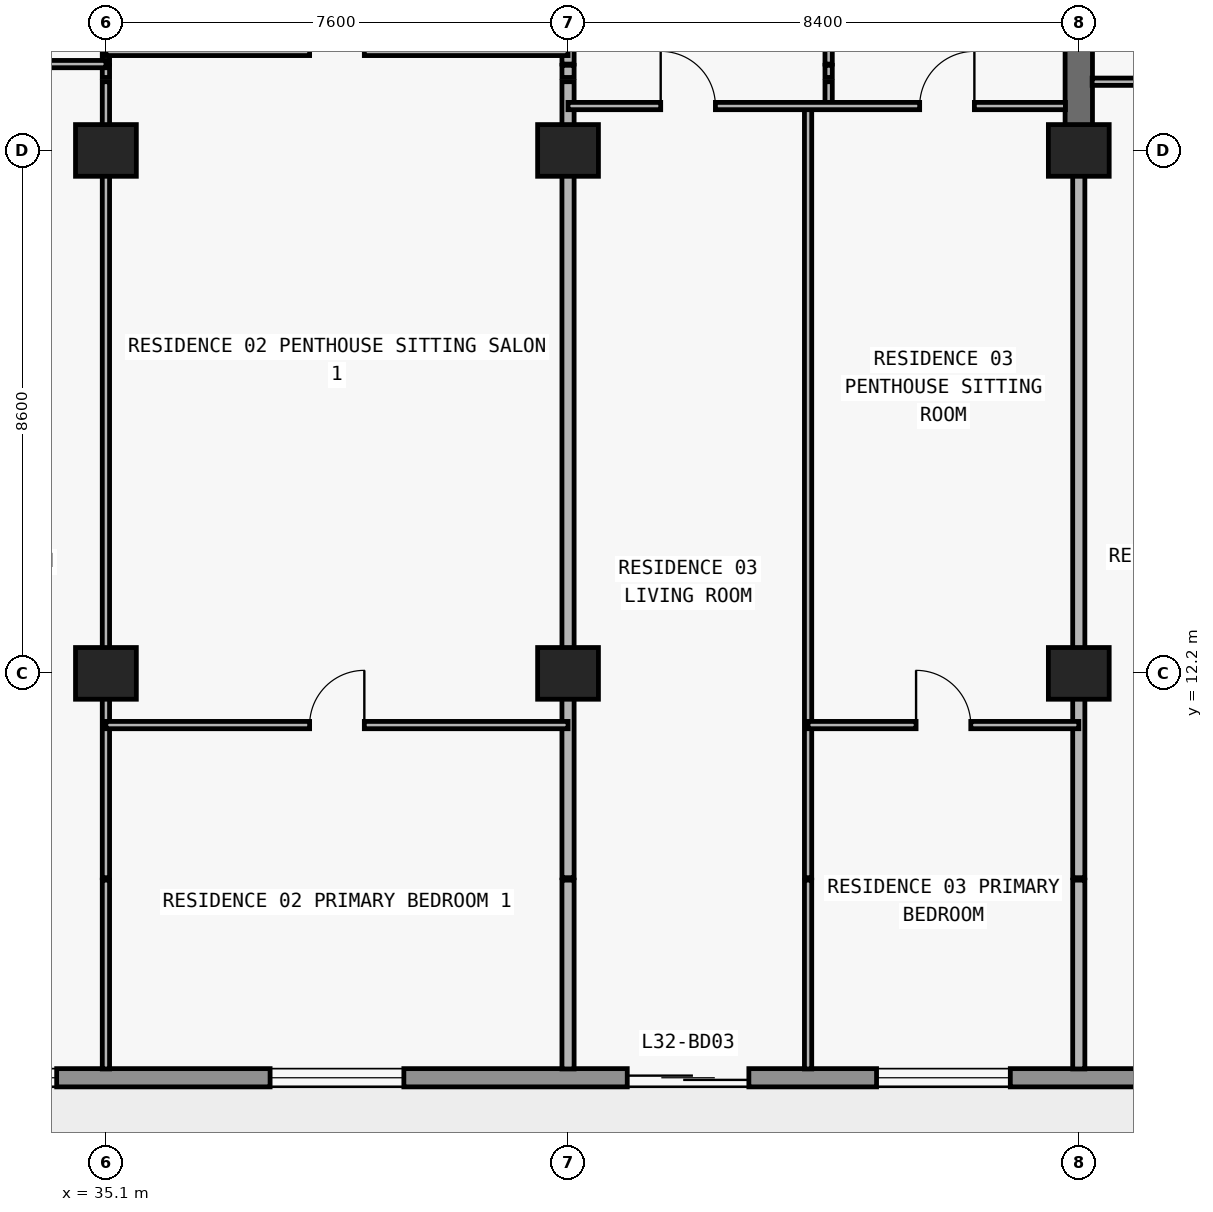
"""IFC4 building model, lengths in metres.
Left out: names, types, materials, properties, quantities, classifications, styles, units other than length and angle.
Written with IfcOpenShell. Run it as: python <this file> out.ifc"""

import sys

from ifc_helpers import new_model, si_unit, direction, frame, frame_2d, origin, origin_2d, place, context, subcontext, project, spatial, rectangle, extrude, element, fill, save


model = new_model("IFC4")
c1 = context("Model", 3, precision=1e-05, world=origin(), true_north=direction((0.0, 1.0)))
c2 = subcontext(c1, "Body", "Model", "MODEL_VIEW")
j1 = project(units=[si_unit("LENGTHUNIT", "METRE"), si_unit("PLANEANGLEUNIT", "RADIAN")], contexts=[c1])
p1 = place(None, origin())
s1 = spatial("IfcSite", under=j1, at=p1, CompositionType="ELEMENT")
p2 = place(p1, origin())
s2 = spatial("IfcBuilding", under=s1, at=p2, CompositionType="ELEMENT")
p3 = place(p2, frame((0.0, 0.0, 119.1)))
s3 = spatial("IfcBuildingStorey", under=s2, at=p3, CompositionType="ELEMENT", Elevation=119.1)
for number, where, z_axis, x_axis in (
    (1, (35.1, 12.2, 0.0), (0.0, 0.0, 1.0), (1.0, 0.0, 0.0)),
    (2, (42.7, 12.2, 0.0), (0.0, 0.0, 1.0), (1.0, 0.0, 0.0)),
    (3, (51.1, 12.2, 0.0), (0.0, 0.0, 1.0), (1.0, 0.0, 0.0)),
    (4, (35.1, 20.8, 0.0), (0.0, 0.0, 1.0), (1.0, 0.0, 0.0)),
    (5, (42.7, 20.8, 0.0), (0.0, 0.0, 1.0), (1.0, 0.0, 0.0)),
    (6, (51.1, 20.8, 0.0), (0.0, 0.0, 1.0), (1.0, 0.0, 0.0)),
):
    element("IfcColumn", number, at=place(p3, frame(where, z_axis=z_axis, x_axis=x_axis)), inside=s3, PredefinedType="COLUMN", context=c2, shape_type="SweptSolid", body=[
        extrude(rectangle(XDim=1.0, YDim=0.85, at=origin_2d()), origin(), (0.0, 0.0, 1.0), 3.05),
    ])
p4 = place(p3, frame((51.1, 20.8, 0.0), z_axis=(0.0, 0.0, 1.0), x_axis=(0.0, 1.0, 0.0)))
e7 = element("IfcWall", 7, at=p4, inside=s3, PredefinedType="SHEAR", context=c2, shape_type="SweptSolid", body=[
    extrude(rectangle(XDim=8.6, YDim=0.45, at=frame_2d((4.3, 0.0))), origin(), (0.0, 0.0, 1.0), 3.05),
])
p5 = place(p3, frame((70.1, 5.55, 0.0), z_axis=(0.0, 0.0, 1.0), x_axis=(-1.0, 0.0, 0.0)))
e8 = element("IfcWall", 8, at=p5, inside=s3, PredefinedType="STANDARD", context=c2, shape_type="SweptSolid", body=[
    extrude(rectangle(XDim=62.4, YDim=0.3, at=frame_2d((31.2, 0.0))), origin(), (0.0, 0.0, 1.0), 3.05),
])
p6 = place(p5, frame((57.29, 0.0, 0.0)))
e9 = element("IfcOpeningElement", 9, at=p6, cuts=e8, PredefinedType="OPENING", context=c2, shape_type="SweptSolid", body=[
    extrude(rectangle(XDim=2.0, YDim=2.3, at=frame_2d((1.0, 1.15))), frame((0.0, 0.16, 0.0), z_axis=(0.0, -1.0, 0.0), x_axis=(1.0, 0.0, 0.0)), (0.0, 0.0, 1.0), 0.32),
])
p7 = place(p5, frame((52.61, 0.0, 0.65)))
e10 = element("IfcOpeningElement", 10, at=p7, cuts=e8, PredefinedType="OPENING", context=c2, shape_type="SweptSolid", body=[
    extrude(rectangle(XDim=2.6, YDim=1.85, at=frame_2d((1.3, 0.925))), frame((0.0, 0.16, 0.0), z_axis=(0.0, -1.0, 0.0), x_axis=(1.0, 0.0, 0.0)), (0.0, 0.0, 1.0), 0.32),
])
p8 = place(p5, frame((46.5, 0.0, 0.85)))
e11 = element("IfcOpeningElement", 11, at=p8, cuts=e8, PredefinedType="OPENING", context=c2, shape_type="SweptSolid", body=[
    extrude(rectangle(XDim=2.2, YDim=1.55, at=frame_2d((1.1, 0.775))), frame((0.0, 0.16, 0.0), z_axis=(0.0, -1.0, 0.0), x_axis=(1.0, 0.0, 0.0)), (0.0, 0.0, 1.0), 0.32),
])
p9 = place(p5, frame((40.49, 0.0, 0.0)))
e12 = element("IfcOpeningElement", 12, at=p9, cuts=e8, PredefinedType="OPENING", context=c2, shape_type="SweptSolid", body=[
    extrude(rectangle(XDim=2.0, YDim=2.3, at=frame_2d((1.0, 1.15))), frame((0.0, 0.16, 0.0), z_axis=(0.0, -1.0, 0.0), x_axis=(1.0, 0.0, 0.0)), (0.0, 0.0, 1.0), 0.32),
])
p10 = place(p5, frame((35.81, 0.0, 0.65)))
e13 = element("IfcOpeningElement", 13, at=p10, cuts=e8, PredefinedType="OPENING", context=c2, shape_type="SweptSolid", body=[
    extrude(rectangle(XDim=2.6, YDim=1.85, at=frame_2d((1.3, 0.925))), frame((0.0, 0.16, 0.0), z_axis=(0.0, -1.0, 0.0), x_axis=(1.0, 0.0, 0.0)), (0.0, 0.0, 1.0), 0.32),
])
p11 = place(p5, frame((30.1, 0.0, 0.85)))
e14 = element("IfcOpeningElement", 14, at=p11, cuts=e8, PredefinedType="OPENING", context=c2, shape_type="SweptSolid", body=[
    extrude(rectangle(XDim=2.2, YDim=1.55, at=frame_2d((1.1, 0.775))), frame((0.0, 0.16, 0.0), z_axis=(0.0, -1.0, 0.0), x_axis=(1.0, 0.0, 0.0)), (0.0, 0.0, 1.0), 0.32),
])
p12 = place(p5, frame((24.426, 0.0, 0.0)))
e15 = element("IfcOpeningElement", 15, at=p12, cuts=e8, PredefinedType="OPENING", context=c2, shape_type="SweptSolid", body=[
    extrude(rectangle(XDim=2.0, YDim=2.3, at=frame_2d((1.0, 1.15))), frame((0.0, 0.16, 0.0), z_axis=(0.0, -1.0, 0.0), x_axis=(1.0, 0.0, 0.0)), (0.0, 0.0, 1.0), 0.32),
])
p13 = place(p5, frame((20.126, 0.0, 0.85)))
e16 = element("IfcOpeningElement", 16, at=p13, cuts=e8, PredefinedType="OPENING", context=c2, shape_type="SweptSolid", body=[
    extrude(rectangle(XDim=2.2, YDim=1.55, at=frame_2d((1.1, 0.775))), frame((0.0, 0.16, 0.0), z_axis=(0.0, -1.0, 0.0), x_axis=(1.0, 0.0, 0.0)), (0.0, 0.0, 1.0), 0.32),
])
p14 = place(p5, frame((15.69, 0.0, 0.0)))
e17 = element("IfcOpeningElement", 17, at=p14, cuts=e8, PredefinedType="OPENING", context=c2, shape_type="SweptSolid", body=[
    extrude(rectangle(XDim=2.0, YDim=2.3, at=frame_2d((1.0, 1.15))), frame((0.0, 0.16, 0.0), z_axis=(0.0, -1.0, 0.0), x_axis=(1.0, 0.0, 0.0)), (0.0, 0.0, 1.0), 0.32),
])
p15 = place(p5, frame((11.59, 0.0, 0.85)))
e18 = element("IfcOpeningElement", 18, at=p15, cuts=e8, PredefinedType="OPENING", context=c2, shape_type="SweptSolid", body=[
    extrude(rectangle(XDim=1.8, YDim=1.55, at=frame_2d((0.9, 0.775))), frame((0.0, 0.16, 0.0), z_axis=(0.0, -1.0, 0.0), x_axis=(1.0, 0.0, 0.0)), (0.0, 0.0, 1.0), 0.32),
])
p16 = place(p5, frame((7.626, 0.0, 0.0)))
e19 = element("IfcOpeningElement", 19, at=p16, cuts=e8, PredefinedType="OPENING", context=c2, shape_type="SweptSolid", body=[
    extrude(rectangle(XDim=2.0, YDim=2.3, at=frame_2d((1.0, 1.15))), frame((0.0, 0.16, 0.0), z_axis=(0.0, -1.0, 0.0), x_axis=(1.0, 0.0, 0.0)), (0.0, 0.0, 1.0), 0.32),
])
p17 = place(p5, frame((3.326, 0.0, 0.85)))
e20 = element("IfcOpeningElement", 20, at=p17, cuts=e8, PredefinedType="OPENING", context=c2, shape_type="SweptSolid", body=[
    extrude(rectangle(XDim=2.2, YDim=1.55, at=frame_2d((1.1, 0.775))), frame((0.0, 0.16, 0.0), z_axis=(0.0, -1.0, 0.0), x_axis=(1.0, 0.0, 0.0)), (0.0, 0.0, 1.0), 0.32),
])
p18 = place(p3, frame((35.1, 5.695, 0.0), z_axis=(0.0, 0.0, 1.0), x_axis=(0.0, 1.0, 0.0)))
e21 = element("IfcWall", 21, at=p18, inside=s3, PredefinedType="PARTITIONING", context=c2, shape_type="SweptSolid", body=[
    extrude(rectangle(XDim=3.105, YDim=0.12, at=frame_2d((1.552, 0.0))), origin(), (0.0, 0.0, 1.0), 3.05),
])
p19 = place(p3, frame((35.1, 8.84, 0.0), z_axis=(0.0, 0.0, 1.0), x_axis=(0.0, 1.0, 0.0)))
e22 = element("IfcWall", 22, at=p19, inside=s3, PredefinedType="PARTITIONING", context=c2, shape_type="SweptSolid", body=[
    extrude(rectangle(XDim=13.09, YDim=0.12, at=frame_2d((6.545, 0.0))), origin(), (0.0, 0.0, 1.0), 2.174),
])
p20 = place(p3, frame((35.1, 22.0, 0.0), z_axis=(0.0, 0.0, 1.0), x_axis=(0.0, 1.0, 0.0)))
e23 = element("IfcWall", 23, at=p20, inside=s3, PredefinedType="PARTITIONING", context=c2, shape_type="SweptSolid", body=[
    extrude(rectangle(XDim=0.2, YDim=0.12, at=frame_2d((0.1, 0.0))), origin(), (0.0, 0.0, 1.0), 2.174),
])
p21 = place(p3, frame((35.1, 22.22, 0.0), z_axis=(0.0, 0.0, 1.0), x_axis=(0.0, 1.0, 0.0)))
e24 = element("IfcWall", 24, at=p21, inside=s3, PredefinedType="PARTITIONING", context=c2, shape_type="SweptSolid", body=[
    extrude(rectangle(XDim=4.38, YDim=0.12, at=frame_2d((2.19, 0.0))), origin(), (0.0, 0.0, 1.0), 2.174),
])
p22 = place(p21, frame((1.84, 0.0, 0.0)))
e25 = element("IfcOpeningElement", 25, at=p22, cuts=e24, PredefinedType="OPENING", context=c2, shape_type="SweptSolid", body=[
    extrude(rectangle(XDim=0.9, YDim=2.124, at=frame_2d((0.45, 1.062))), frame((0.0, 0.07, 0.0), z_axis=(0.0, -1.0, 0.0), x_axis=(1.0, 0.0, 0.0)), (0.0, 0.0, 1.0), 0.14),
])
p23 = place(p3, frame((42.7, 5.695, 0.0), z_axis=(0.0, 0.0, 1.0), x_axis=(0.0, 1.0, 0.0)))
e26 = element("IfcWall", 26, at=p23, inside=s3, PredefinedType="PARTITIONING", context=c2, shape_type="SweptSolid", body=[
    extrude(rectangle(XDim=3.105, YDim=0.2, at=frame_2d((1.552, 0.0))), origin(), (0.0, 0.0, 1.0), 3.05),
])
p24 = place(p3, frame((42.7, 8.84, 0.0), z_axis=(0.0, 0.0, 1.0), x_axis=(0.0, 1.0, 0.0)))
e27 = element("IfcWall", 27, at=p24, inside=s3, PredefinedType="PARTITIONING", context=c2, shape_type="SweptSolid", body=[
    extrude(rectangle(XDim=13.09, YDim=0.2, at=frame_2d((6.545, 0.0))), origin(), (0.0, 0.0, 1.0), 2.174),
])
p25 = place(p3, frame((42.7, 22.0, 0.0), z_axis=(0.0, 0.0, 1.0), x_axis=(0.0, 1.0, 0.0)))
e28 = element("IfcWall", 28, at=p25, inside=s3, PredefinedType="PARTITIONING", context=c2, shape_type="SweptSolid", body=[
    extrude(rectangle(XDim=0.2, YDim=0.2, at=frame_2d((0.1, 0.0))), origin(), (0.0, 0.0, 1.0), 2.174),
])
p26 = place(p3, frame((42.7, 22.22, 0.0), z_axis=(0.0, 0.0, 1.0), x_axis=(0.0, 1.0, 0.0)))
e29 = element("IfcWall", 29, at=p26, inside=s3, PredefinedType="PARTITIONING", context=c2, shape_type="SweptSolid", body=[
    extrude(rectangle(XDim=4.38, YDim=0.2, at=frame_2d((2.19, 0.0))), origin(), (0.0, 0.0, 1.0), 2.174),
])
p27 = place(p3, frame((46.648, 5.695, 0.0), z_axis=(0.0, 0.0, 1.0), x_axis=(0.0, 1.0, 0.0)))
e30 = element("IfcWall", 30, at=p27, inside=s3, PredefinedType="PARTITIONING", context=c2, shape_type="SweptSolid", body=[
    extrude(rectangle(XDim=3.105, YDim=0.12, at=frame_2d((1.552, 0.0))), origin(), (0.0, 0.0, 1.0), 3.05),
])
p28 = place(p3, frame((46.648, 8.84, 0.0), z_axis=(0.0, 0.0, 1.0), x_axis=(0.0, 1.0, 0.0)))
e31 = element("IfcWall", 31, at=p28, inside=s3, PredefinedType="PARTITIONING", context=c2, shape_type="SweptSolid", body=[
    extrude(rectangle(XDim=12.69, YDim=0.12, at=frame_2d((6.345, 0.0))), origin(), (0.0, 0.0, 1.0), 3.05),
])
p29 = place(p3, frame((46.986, 21.53, 0.0), z_axis=(0.0, 0.0, 1.0), x_axis=(0.0, 1.0, 0.0)))
e32 = element("IfcWall", 32, at=p29, inside=s3, PredefinedType="PARTITIONING", context=c2, shape_type="SweptSolid", body=[
    extrude(rectangle(XDim=0.4, YDim=0.12, at=frame_2d((0.2, 0.0))), origin(), (0.0, 0.0, 1.0), 3.05),
])
p30 = place(p3, frame((46.986, 22.0, 0.0), z_axis=(0.0, 0.0, 1.0), x_axis=(0.0, 1.0, 0.0)))
e33 = element("IfcWall", 33, at=p30, inside=s3, PredefinedType="PARTITIONING", context=c2, shape_type="SweptSolid", body=[
    extrude(rectangle(XDim=0.2, YDim=0.12, at=frame_2d((0.1, 0.0))), origin(), (0.0, 0.0, 1.0), 3.05),
])
p31 = place(p3, frame((46.986, 22.22, 0.0), z_axis=(0.0, 0.0, 1.0), x_axis=(0.0, 1.0, 0.0)))
e34 = element("IfcWall", 34, at=p31, inside=s3, PredefinedType="PARTITIONING", context=c2, shape_type="SweptSolid", body=[
    extrude(rectangle(XDim=4.38, YDim=0.12, at=frame_2d((2.19, 0.0))), origin(), (0.0, 0.0, 1.0), 3.05),
])
p32 = place(p31, frame((1.74, 0.0, 0.0)))
e35 = element("IfcOpeningElement", 35, at=p32, cuts=e34, PredefinedType="OPENING", context=c2, shape_type="SweptSolid", body=[
    extrude(rectangle(XDim=0.9, YDim=2.15, at=frame_2d((0.45, 1.075))), frame((0.0, 0.07, 0.0), z_axis=(0.0, -1.0, 0.0), x_axis=(1.0, 0.0, 0.0)), (0.0, 0.0, 1.0), 0.14),
])
p33 = place(p3, frame((51.1, 5.695, 0.0), z_axis=(0.0, 0.0, 1.0), x_axis=(0.0, 1.0, 0.0)))
e36 = element("IfcWall", 36, at=p33, inside=s3, PredefinedType="PARTITIONING", context=c2, shape_type="SweptSolid", body=[
    extrude(rectangle(XDim=3.105, YDim=0.2, at=frame_2d((1.552, 0.0))), origin(), (0.0, 0.0, 1.0), 3.05),
])
p34 = place(p3, frame((51.1, 8.84, 0.0), z_axis=(0.0, 0.0, 1.0), x_axis=(0.0, 1.0, 0.0)))
e37 = element("IfcWall", 37, at=p34, inside=s3, PredefinedType="PARTITIONING", context=c2, shape_type="SweptSolid", body=[
    extrude(rectangle(XDim=11.955, YDim=0.2, at=frame_2d((5.978, 0.0))), origin(), (0.0, 0.0, 1.0), 2.174),
])
p35 = place(p3, frame((35.1, 11.35, 0.0), z_axis=(0.0, 0.0, 1.0), x_axis=(1.0, 0.0, 0.0)))
e38 = element("IfcWall", 38, at=p35, inside=s3, PredefinedType="PARTITIONING", context=c2, shape_type="SweptSolid", body=[
    extrude(rectangle(XDim=7.6, YDim=0.12, at=frame_2d((3.8, 0.0))), origin(), (0.0, 0.0, 1.0), 3.05),
])
p36 = place(p35, frame((3.35, 0.0, 0.0)))
e39 = element("IfcOpeningElement", 39, at=p36, cuts=e38, PredefinedType="OPENING", context=c2, shape_type="SweptSolid", body=[
    extrude(rectangle(XDim=0.9, YDim=2.15, at=frame_2d((0.45, 1.075))), frame((0.0, 0.07, 0.0), z_axis=(0.0, -1.0, 0.0), x_axis=(1.0, 0.0, 0.0)), (0.0, 0.0, 1.0), 0.14),
])
p37 = place(p3, frame((46.648, 11.35, 0.0), z_axis=(0.0, 0.0, 1.0), x_axis=(1.0, 0.0, 0.0)))
e40 = element("IfcWall", 40, at=p37, inside=s3, PredefinedType="PARTITIONING", context=c2, shape_type="SweptSolid", body=[
    extrude(rectangle(XDim=4.452, YDim=0.12, at=frame_2d((2.226, 0.0))), origin(), (0.0, 0.0, 1.0), 3.05),
])
p38 = place(p37, frame((1.776, 0.0, 0.0)))
e41 = element("IfcOpeningElement", 41, at=p38, cuts=e40, PredefinedType="OPENING", context=c2, shape_type="SweptSolid", body=[
    extrude(rectangle(XDim=0.9, YDim=2.15, at=frame_2d((0.45, 1.075))), frame((0.0, 0.07, 0.0), z_axis=(0.0, -1.0, 0.0), x_axis=(1.0, 0.0, 0.0)), (0.0, 0.0, 1.0), 0.14),
])
p39 = place(p3, frame((42.7, 21.53, 0.0), z_axis=(0.0, 0.0, 1.0), x_axis=(1.0, 0.0, 0.0)))
e42 = element("IfcWall", 42, at=p39, inside=s3, PredefinedType="PARTITIONING", context=c2, shape_type="SweptSolid", body=[
    extrude(rectangle(XDim=8.18, YDim=0.12, at=frame_2d((4.09, 0.0))), origin(), (0.0, 0.0, 1.0), 3.05),
])
p40 = place(p39, frame((1.524, 0.0, 0.0)))
e43 = element("IfcOpeningElement", 43, at=p40, cuts=e42, PredefinedType="OPENING", context=c2, shape_type="SweptSolid", body=[
    extrude(rectangle(XDim=0.9, YDim=2.15, at=frame_2d((0.45, 1.075))), frame((0.0, 0.07, 0.0), z_axis=(0.0, -1.0, 0.0), x_axis=(1.0, 0.0, 0.0)), (0.0, 0.0, 1.0), 0.14),
])
p41 = place(p39, frame((5.783, 0.0, 0.0)))
e44 = element("IfcOpeningElement", 44, at=p41, cuts=e42, PredefinedType="OPENING", context=c2, shape_type="SweptSolid", body=[
    extrude(rectangle(XDim=0.9, YDim=2.15, at=frame_2d((0.45, 1.075))), frame((0.0, 0.07, 0.0), z_axis=(0.0, -1.0, 0.0), x_axis=(1.0, 0.0, 0.0)), (0.0, 0.0, 1.0), 0.14),
])
p42 = place(p3, frame((51.32, 21.93, 0.0), z_axis=(0.0, 0.0, 1.0), x_axis=(1.0, 0.0, 0.0)))
e45 = element("IfcWall", 45, at=p42, inside=s3, PredefinedType="PARTITIONING", context=c2, shape_type="SweptSolid", body=[
    extrude(rectangle(XDim=8.18, YDim=0.12, at=frame_2d((4.09, 0.0))), origin(), (0.0, 0.0, 1.0), 3.05),
])
p43 = place(p42, frame((1.708, 0.0, 0.0)))
e46 = element("IfcOpeningElement", 46, at=p43, cuts=e45, PredefinedType="OPENING", context=c2, shape_type="SweptSolid", body=[
    extrude(rectangle(XDim=0.9, YDim=2.15, at=frame_2d((0.45, 1.075))), frame((0.0, 0.07, 0.0), z_axis=(0.0, -1.0, 0.0), x_axis=(1.0, 0.0, 0.0)), (0.0, 0.0, 1.0), 0.14),
])
p44 = place(p42, frame((5.84, 0.0, 0.0)))
e47 = element("IfcOpeningElement", 47, at=p44, cuts=e45, PredefinedType="OPENING", context=c2, shape_type="SweptSolid", body=[
    extrude(rectangle(XDim=0.9, YDim=2.15, at=frame_2d((0.45, 1.075))), frame((0.0, 0.07, 0.0), z_axis=(0.0, -1.0, 0.0), x_axis=(1.0, 0.0, 0.0)), (0.0, 0.0, 1.0), 0.14),
])
p45 = place(p3, frame((26.92, 22.22, 0.0), z_axis=(0.0, 0.0, 1.0), x_axis=(1.0, 0.0, 0.0)))
e48 = element("IfcWall", 48, at=p45, inside=s3, PredefinedType="PARTITIONING", context=c2, shape_type="SweptSolid", body=[
    extrude(rectangle(XDim=8.18, YDim=0.12, at=frame_2d((4.09, 0.0))), origin(), (0.0, 0.0, 1.0), 3.05),
])
p46 = place(p45, frame((1.204, 0.0, 0.0)))
e49 = element("IfcOpeningElement", 49, at=p46, cuts=e48, PredefinedType="OPENING", context=c2, shape_type="SweptSolid", body=[
    extrude(rectangle(XDim=0.9, YDim=2.15, at=frame_2d((0.45, 1.075))), frame((0.0, 0.07, 0.0), z_axis=(0.0, -1.0, 0.0), x_axis=(1.0, 0.0, 0.0)), (0.0, 0.0, 1.0), 0.14),
])
p47 = place(p3, frame((35.1, 22.42, 0.0), z_axis=(0.0, 0.0, 1.0), x_axis=(1.0, 0.0, 0.0)))
e50 = element("IfcWall", 50, at=p47, inside=s3, PredefinedType="PARTITIONING", context=c2, shape_type="SweptSolid", body=[
    extrude(rectangle(XDim=7.6, YDim=0.12, at=frame_2d((3.8, 0.0))), origin(), (0.0, 0.0, 1.0), 3.05),
])
p48 = place(p47, frame((3.35, 0.0, 0.0)))
e51 = element("IfcOpeningElement", 51, at=p48, cuts=e50, PredefinedType="OPENING", context=c2, shape_type="SweptSolid", body=[
    extrude(rectangle(XDim=0.9, YDim=2.15, at=frame_2d((0.45, 1.075))), frame((0.0, 0.07, 0.0), z_axis=(0.0, -1.0, 0.0), x_axis=(1.0, 0.0, 0.0)), (0.0, 0.0, 1.0), 0.14),
])
p49 = place(p10, origin())
e52 = element("IfcWindow", 52, at=p49, inside=s3, PartitioningType="SINGLE_PANEL", PredefinedType="WINDOW", context=c2, shape_type="SweptSolid", body=[
    extrude(rectangle(XDim=2.6, YDim=1.85, at=frame_2d((1.3, 0.925))), frame((0.0, 0.03, 0.0), z_axis=(0.0, -1.0, 0.0), x_axis=(1.0, 0.0, 0.0)), (0.0, 0.0, 1.0), 0.06),
])
fill(e13, e52)
p50 = place(p11, origin())
e53 = element("IfcWindow", 53, at=p50, inside=s3, PartitioningType="SINGLE_PANEL", PredefinedType="WINDOW", context=c2, shape_type="SweptSolid", body=[
    extrude(rectangle(XDim=2.2, YDim=1.55, at=frame_2d((1.1, 0.775))), frame((0.0, 0.03, 0.0), z_axis=(0.0, -1.0, 0.0), x_axis=(1.0, 0.0, 0.0)), (0.0, 0.0, 1.0), 0.06),
])
fill(e14, e53)
p51 = place(p12, origin())
e54 = element("IfcDoor", 54, at=p51, inside=s3, OperationType="DOUBLE_DOOR_SLIDING", PredefinedType="DOOR", context=c2, shape_type="SweptSolid", body=[
    extrude(rectangle(XDim=2.0, YDim=2.3, at=frame_2d((1.0, 1.15))), frame((0.0, 0.025, 0.0), z_axis=(0.0, -1.0, 0.0), x_axis=(1.0, 0.0, 0.0)), (0.0, 0.0, 1.0), 0.05),
])
fill(e15, e54)
p52 = place(p13, origin())
e55 = element("IfcWindow", 55, at=p52, inside=s3, PartitioningType="SINGLE_PANEL", PredefinedType="WINDOW", context=c2, shape_type="SweptSolid", body=[
    extrude(rectangle(XDim=2.2, YDim=1.55, at=frame_2d((1.1, 0.775))), frame((0.0, 0.03, 0.0), z_axis=(0.0, -1.0, 0.0), x_axis=(1.0, 0.0, 0.0)), (0.0, 0.0, 1.0), 0.06),
])
fill(e16, e55)
p53 = place(p48, origin())
e56 = element("IfcDoor", 56, at=p53, inside=s3, OperationType="SINGLE_SWING_LEFT", PredefinedType="DOOR", context=c2, shape_type="SweptSolid", body=[
    extrude(rectangle(XDim=0.9, YDim=2.15, at=frame_2d((0.45, 1.075))), frame((0.0, 0.025, 0.0), z_axis=(0.0, -1.0, 0.0), x_axis=(1.0, 0.0, 0.0)), (0.0, 0.0, 1.0), 0.05),
])
fill(e51, e56)
p54 = place(p36, origin())
e57 = element("IfcDoor", 57, at=p54, inside=s3, OperationType="SINGLE_SWING_RIGHT", PredefinedType="DOOR", context=c2, shape_type="SweptSolid", body=[
    extrude(rectangle(XDim=0.9, YDim=2.15, at=frame_2d((0.45, 1.075))), frame((0.0, 0.025, 0.0), z_axis=(0.0, -1.0, 0.0), x_axis=(1.0, 0.0, 0.0)), (0.0, 0.0, 1.0), 0.05),
])
fill(e39, e57)
p55 = place(p40, origin())
e58 = element("IfcDoor", 58, at=p55, inside=s3, OperationType="SINGLE_SWING_LEFT", PredefinedType="DOOR", context=c2, shape_type="SweptSolid", body=[
    extrude(rectangle(XDim=0.9, YDim=2.15, at=frame_2d((0.45, 1.075))), frame((0.0, 0.025, 0.0), z_axis=(0.0, -1.0, 0.0), x_axis=(1.0, 0.0, 0.0)), (0.0, 0.0, 1.0), 0.05),
])
fill(e43, e58)
p56 = place(p41, origin())
e59 = element("IfcDoor", 59, at=p56, inside=s3, OperationType="SINGLE_SWING_RIGHT", PredefinedType="DOOR", context=c2, shape_type="SweptSolid", body=[
    extrude(rectangle(XDim=0.9, YDim=2.15, at=frame_2d((0.45, 1.075))), frame((0.0, 0.025, 0.0), z_axis=(0.0, -1.0, 0.0), x_axis=(1.0, 0.0, 0.0)), (0.0, 0.0, 1.0), 0.05),
])
fill(e44, e59)
p57 = place(p38, origin())
e60 = element("IfcDoor", 60, at=p57, inside=s3, OperationType="SINGLE_SWING_LEFT", PredefinedType="DOOR", context=c2, shape_type="SweptSolid", body=[
    extrude(rectangle(XDim=0.9, YDim=2.15, at=frame_2d((0.45, 1.075))), frame((0.0, 0.025, 0.0), z_axis=(0.0, -1.0, 0.0), x_axis=(1.0, 0.0, 0.0)), (0.0, 0.0, 1.0), 0.05),
])
fill(e41, e60)
save(model, sys.argv[1])
